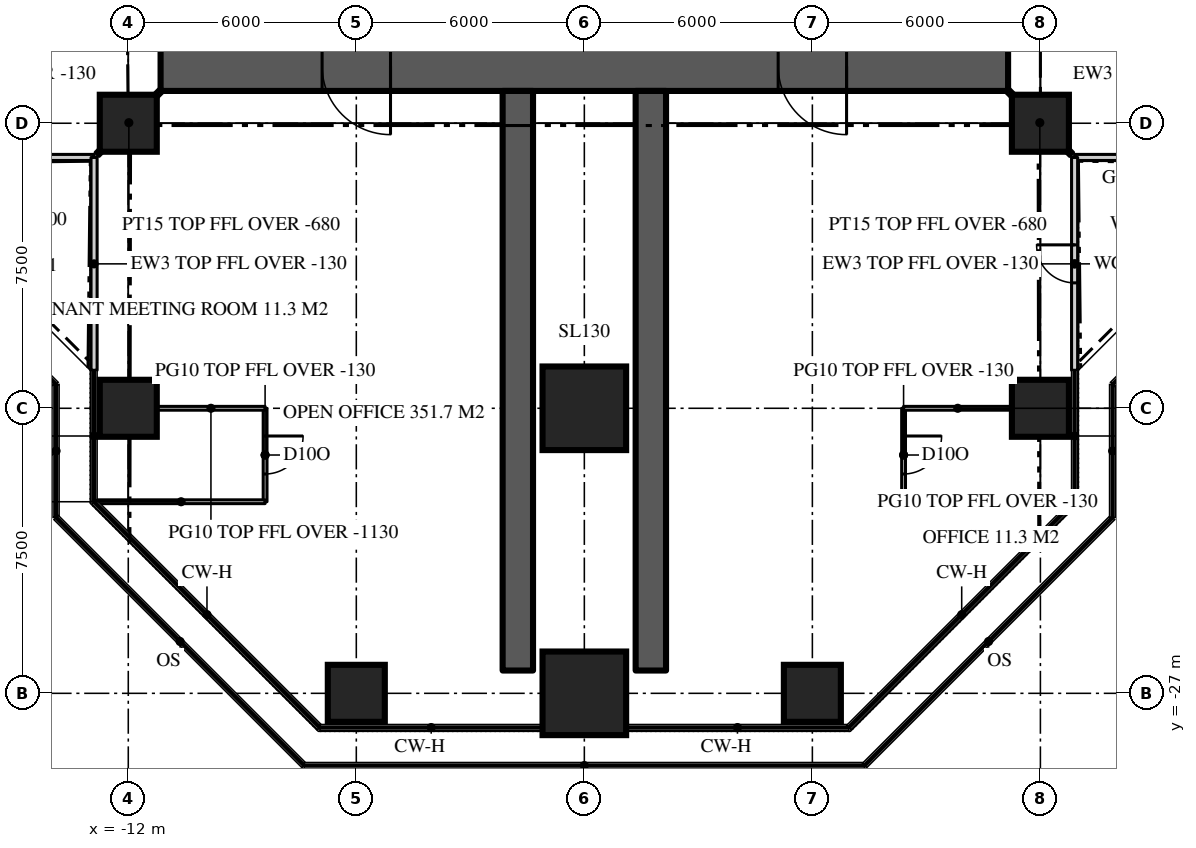
"""IFC4 building model, lengths in metres.
Left out: names, types, materials, properties, quantities, classifications, styles, units other than length and angle.
Written with IfcOpenShell. Run it as: python <this file> out.ifc"""

import sys

from ifc_helpers import new_model, si_unit, direction, frame, frame_2d, origin, origin_2d, place, context, subcontext, project, spatial, rectangle, extrude, element, fill, save


model = new_model("IFC4")
c1 = context("Model", 3, precision=1e-05, world=origin(), true_north=direction((0.0, 1.0)))
c2 = subcontext(c1, "Body", "Model", "MODEL_VIEW")
j1 = project(units=[si_unit("LENGTHUNIT", "METRE"), si_unit("PLANEANGLEUNIT", "RADIAN")], contexts=[c1])
p1 = place(None, origin())
s1 = spatial("IfcSite", under=j1, at=p1, CompositionType="ELEMENT")
p2 = place(p1, origin())
s2 = spatial("IfcBuilding", under=s1, at=p2, CompositionType="ELEMENT")
p3 = place(p2, frame((0.0, 0.0, 263.4)))
s3 = spatial("IfcBuildingStorey", under=s2, at=p3, CompositionType="ELEMENT", Elevation=263.4)
p4 = place(p3, frame((11.15, -10.5, 0.0), z_axis=(0.0, 0.0, 1.0), x_axis=(-1.0, 0.0, 0.0)))
e1 = element("IfcWall", 1, at=p4, inside=s3, PredefinedType="SHEAR", context=c2, shape_type="SweptSolid", body=[
    extrude(rectangle(XDim=22.3, YDim=1.3, at=frame_2d((11.15, 0.0))), origin(), (0.0, 0.0, 1.0), 3.9),
])
p5 = place(p4, frame((16.25, 0.0, 0.0)))
e2 = element("IfcOpeningElement", 2, at=p5, cuts=e1, PredefinedType="OPENING", context=c2, shape_type="SweptSolid", body=[
    extrude(rectangle(XDim=1.8, YDim=2.2, at=frame_2d((0.9, 1.1))), frame((0.0, 0.66, 0.0), z_axis=(0.0, -1.0, 0.0), x_axis=(1.0, 0.0, 0.0)), (0.0, 0.0, 1.0), 1.32),
])
p6 = place(p4, frame((4.25, 0.0, 0.0)))
e3 = element("IfcOpeningElement", 3, at=p6, cuts=e1, PredefinedType="OPENING", context=c2, shape_type="SweptSolid", body=[
    extrude(rectangle(XDim=1.8, YDim=2.2, at=frame_2d((0.9, 1.1))), frame((0.0, 0.66, 0.0), z_axis=(0.0, -1.0, 0.0), x_axis=(1.0, 0.0, 0.0)), (0.0, 0.0, 1.0), 1.32),
])
for number, where, z_axis, x_axis in (
    (4, (-1.75, -11.15, 0.0), (0.0, 0.0, 1.0), (0.0, -1.0, 0.0)),
    (5, (1.75, -11.15, 0.0), (0.0, 0.0, 1.0), (0.0, -1.0, 0.0)),
):
    element("IfcWall", number, at=place(p3, frame(where, z_axis=z_axis, x_axis=x_axis)), inside=s3, PredefinedType="SHEAR", context=c2, shape_type="SweptSolid", body=[
        extrude(rectangle(XDim=15.25, YDim=0.8, at=frame_2d((7.625, 0.0))), origin(), (0.0, 0.0, 1.0), 3.9),
    ])
p7 = place(p3, frame((-6.0, -27.0, 0.0), z_axis=(0.0, 0.0, 1.0), x_axis=(1.0, 0.0, 0.0)))
e6 = element("IfcColumn", 6, at=p7, inside=s3, PredefinedType="COLUMN", context=c2, shape_type="SweptSolid", body=[
    extrude(rectangle(XDim=1.5, YDim=1.5, at=origin_2d()), origin(), (0.0, 0.0, 1.0), 3.9),
])
p8 = place(p3, frame((0.0, -27.0, 0.0), z_axis=(0.0, 0.0, 1.0), x_axis=(1.0, 0.0, 0.0)))
e7 = element("IfcColumn", 7, at=p8, inside=s3, PredefinedType="COLUMN", context=c2, shape_type="SweptSolid", body=[
    extrude(rectangle(XDim=2.2, YDim=2.2, at=origin_2d()), origin(), (0.0, 0.0, 1.0), 3.9),
])
for number, where, z_axis, x_axis in (
    (8, (6.0, -27.0, 0.0), (0.0, 0.0, 1.0), (1.0, 0.0, 0.0)),
    (9, (-12.0, -19.5, 0.0), (0.0, 0.0, 1.0), (1.0, 0.0, 0.0)),
):
    element("IfcColumn", number, at=place(p3, frame(where, z_axis=z_axis, x_axis=x_axis)), inside=s3, PredefinedType="COLUMN", context=c2, shape_type="SweptSolid", body=[
        extrude(rectangle(XDim=1.5, YDim=1.5, at=origin_2d()), origin(), (0.0, 0.0, 1.0), 3.9),
    ])
p9 = place(p3, frame((0.0, -19.5, 0.0), z_axis=(0.0, 0.0, 1.0), x_axis=(1.0, 0.0, 0.0)))
e10 = element("IfcColumn", 10, at=p9, inside=s3, PredefinedType="COLUMN", context=c2, shape_type="SweptSolid", body=[
    extrude(rectangle(XDim=2.2, YDim=2.2, at=origin_2d()), origin(), (0.0, 0.0, 1.0), 3.9),
])
for number, where, z_axis, x_axis in (
    (11, (12.0, -19.5, 0.0), (0.0, 0.0, 1.0), (1.0, 0.0, 0.0)),
    (12, (-12.0, -12.0, 0.0), (0.0, 0.0, 1.0), (1.0, 0.0, 0.0)),
    (13, (12.0, -12.0, 0.0), (0.0, 0.0, 1.0), (1.0, 0.0, 0.0)),
):
    element("IfcColumn", number, at=place(p3, frame(where, z_axis=z_axis, x_axis=x_axis)), inside=s3, PredefinedType="COLUMN", context=c2, shape_type="SweptSolid", body=[
        extrude(rectangle(XDim=1.5, YDim=1.5, at=origin_2d()), origin(), (0.0, 0.0, 1.0), 3.9),
    ])
p10 = place(p3, frame((12.9, -12.9, 0.0), z_axis=(0.0, 0.0, 1.0), x_axis=(1.0, 0.0, 0.0)))
e14 = element("IfcWall", 14, at=p10, inside=s3, PredefinedType="SOLIDWALL", context=c2, shape_type="SweptSolid", body=[
    extrude(rectangle(XDim=5.6, YDim=0.16, at=frame_2d((2.8, 0.0))), origin(), (0.0, 0.0, 1.0), 3.77),
])
p11 = place(p3, frame((-18.5, -12.9, 0.0), z_axis=(0.0, 0.0, 1.0), x_axis=(1.0, 0.0, 0.0)))
e15 = element("IfcWall", 15, at=p11, inside=s3, PredefinedType="SOLIDWALL", context=c2, shape_type="SweptSolid", body=[
    extrude(rectangle(XDim=5.6, YDim=0.16, at=frame_2d((2.8, 0.0))), origin(), (0.0, 0.0, 1.0), 3.77),
])
p12 = place(p11, frame((2.3, 0.0, 0.0)))
e16 = element("IfcOpeningElement", 16, at=p12, cuts=e15, PredefinedType="OPENING", context=c2, shape_type="SweptSolid", body=[
    extrude(rectangle(XDim=1.0, YDim=2.2, at=frame_2d((0.5, 1.1))), frame((0.0, 0.09, 0.0), z_axis=(0.0, -1.0, 0.0), x_axis=(1.0, 0.0, 0.0)), (0.0, 0.0, 1.0), 0.18),
])
p13 = place(p3, frame((-12.9, -12.9, 0.0), z_axis=(0.0, 0.0, 1.0), x_axis=(0.0, -1.0, 0.0)))
e17 = element("IfcWall", 17, at=p13, inside=s3, PredefinedType="SOLIDWALL", context=c2, shape_type="SweptSolid", body=[
    extrude(rectangle(XDim=5.6, YDim=0.16, at=frame_2d((2.8, 0.0))), origin(), (0.0, 0.0, 1.0), 3.77),
])
p14 = place(p3, frame((12.9, -18.5, 0.0), z_axis=(0.0, 0.0, 1.0), x_axis=(0.0, 1.0, 0.0)))
e18 = element("IfcWall", 18, at=p14, inside=s3, PredefinedType="SOLIDWALL", context=c2, shape_type="SweptSolid", body=[
    extrude(rectangle(XDim=5.6, YDim=0.16, at=frame_2d((2.8, 0.0))), origin(), (0.0, 0.0, 1.0), 3.77),
])
p15 = place(p14, frame((2.3, 0.0, 0.0)))
e19 = element("IfcOpeningElement", 19, at=p15, cuts=e18, PredefinedType="OPENING", context=c2, shape_type="SweptSolid", body=[
    extrude(rectangle(XDim=1.0, YDim=2.2, at=frame_2d((0.5, 1.1))), frame((0.0, 0.09, 0.0), z_axis=(0.0, -1.0, 0.0), x_axis=(1.0, 0.0, 0.0)), (0.0, 0.0, 1.0), 0.18),
])
p16 = place(p3, frame((8.4, -19.5, 0.0), z_axis=(0.0, 0.0, 1.0), x_axis=(0.0, -1.0, 0.0)))
e20 = element("IfcWall", 20, at=p16, inside=s3, PredefinedType="PARTITIONING", context=c2, shape_type="SweptSolid", body=[
    extrude(rectangle(XDim=2.459, YDim=0.1, at=frame_2d((1.229, 0.0))), origin(), (0.0, 0.0, 1.0), 3.77),
])
p17 = place(p16, frame((0.729, 0.0, 0.0)))
e21 = element("IfcOpeningElement", 21, at=p17, cuts=e20, PredefinedType="OPENING", context=c2, shape_type="SweptSolid", body=[
    extrude(rectangle(XDim=1.0, YDim=2.2, at=frame_2d((0.5, 1.1))), frame((0.0, 0.06, 0.0), z_axis=(0.0, -1.0, 0.0), x_axis=(1.0, 0.0, 0.0)), (0.0, 0.0, 1.0), 0.12),
])
p18 = place(p3, frame((8.4, -19.5, 0.0), z_axis=(0.0, 0.0, 1.0), x_axis=(1.0, 0.0, 0.0)))
e22 = element("IfcWall", 22, at=p18, inside=s3, PredefinedType="PARTITIONING", context=c2, shape_type="SweptSolid", body=[
    extrude(rectangle(XDim=2.85, YDim=0.1, at=frame_2d((1.425, 0.0))), origin(), (0.0, 0.0, 1.0), 2.77),
])
p19 = place(p3, frame((8.4, -21.959, 0.0), z_axis=(0.0, 0.0, 1.0), x_axis=(1.0, 0.0, 0.0)))
e23 = element("IfcWall", 23, at=p19, inside=s3, PredefinedType="PARTITIONING", context=c2, shape_type="SweptSolid", body=[
    extrude(rectangle(XDim=4.42, YDim=0.1, at=frame_2d((2.21, 0.0))), origin(), (0.0, 0.0, 1.0), 3.77),
])
p20 = place(p3, frame((-8.4, -19.5, 0.0), z_axis=(0.0, 0.0, 1.0), x_axis=(0.0, -1.0, 0.0)))
e24 = element("IfcWall", 24, at=p20, inside=s3, PredefinedType="PARTITIONING", context=c2, shape_type="SweptSolid", body=[
    extrude(rectangle(XDim=2.459, YDim=0.1, at=frame_2d((1.229, 0.0))), origin(), (0.0, 0.0, 1.0), 3.77),
])
p21 = place(p20, frame((0.729, 0.0, 0.0)))
e25 = element("IfcOpeningElement", 25, at=p21, cuts=e24, PredefinedType="OPENING", context=c2, shape_type="SweptSolid", body=[
    extrude(rectangle(XDim=1.0, YDim=2.2, at=frame_2d((0.5, 1.1))), frame((0.0, 0.06, 0.0), z_axis=(0.0, -1.0, 0.0), x_axis=(1.0, 0.0, 0.0)), (0.0, 0.0, 1.0), 0.12),
])
p22 = place(p3, frame((-8.4, -19.5, 0.0), z_axis=(0.0, 0.0, 1.0), x_axis=(-1.0, 0.0, 0.0)))
e26 = element("IfcWall", 26, at=p22, inside=s3, PredefinedType="PARTITIONING", context=c2, shape_type="SweptSolid", body=[
    extrude(rectangle(XDim=2.85, YDim=0.1, at=frame_2d((1.425, 0.0))), origin(), (0.0, 0.0, 1.0), 2.77),
])
p23 = place(p3, frame((-8.4, -21.959, 0.0), z_axis=(0.0, 0.0, 1.0), x_axis=(-1.0, 0.0, 0.0)))
e27 = element("IfcWall", 27, at=p23, inside=s3, PredefinedType="PARTITIONING", context=c2, shape_type="SweptSolid", body=[
    extrude(rectangle(XDim=4.42, YDim=0.1, at=frame_2d((2.21, 0.0))), origin(), (0.0, 0.0, 1.0), 3.77),
])
for number, where, z_axis, x_axis in (
    (28, (-11.15, -11.15, 0.0), (0.0, 0.0, 1.0), (-0.707, -0.707, 0.0)),
    (29, (11.15, -11.15, 0.0), (0.0, 0.0, 1.0), (0.707, -0.707, 0.0)),
):
    element("IfcWall", number, at=place(p3, frame(where, z_axis=z_axis, x_axis=x_axis)), inside=s3, PredefinedType="PARTITIONING", context=c2, shape_type="SweptSolid", body=[
        extrude(rectangle(XDim=2.362, YDim=0.15, at=frame_2d((1.181, 0.0))), origin(), (0.0, 0.0, 1.0), 3.22),
    ])
p24 = place(p15, origin())
e30 = element("IfcDoor", 30, at=p24, inside=s3, OperationType="SINGLE_SWING_RIGHT", PredefinedType="DOOR", context=c2, shape_type="SweptSolid", body=[
    extrude(rectangle(XDim=1.0, YDim=2.2, at=frame_2d((0.5, 1.1))), frame((0.0, 0.025, 0.0), z_axis=(0.0, -1.0, 0.0), x_axis=(1.0, 0.0, 0.0)), (0.0, 0.0, 1.0), 0.05),
])
fill(e19, e30)
p25 = place(p5, origin())
e31 = element("IfcDoor", 31, at=p25, inside=s3, OperationType="DOUBLE_DOOR_DOUBLE_SWING", PredefinedType="DOOR", context=c2, shape_type="SweptSolid", body=[
    extrude(rectangle(XDim=1.8, YDim=2.2, at=frame_2d((0.9, 1.1))), frame((0.0, 0.025, 0.0), z_axis=(0.0, -1.0, 0.0), x_axis=(1.0, 0.0, 0.0)), (0.0, 0.0, 1.0), 0.05),
])
fill(e2, e31)
p26 = place(p6, origin())
e32 = element("IfcDoor", 32, at=p26, inside=s3, OperationType="DOUBLE_DOOR_DOUBLE_SWING", PredefinedType="DOOR", context=c2, shape_type="SweptSolid", body=[
    extrude(rectangle(XDim=1.8, YDim=2.2, at=frame_2d((0.9, 1.1))), frame((0.0, 0.025, 0.0), z_axis=(0.0, -1.0, 0.0), x_axis=(1.0, 0.0, 0.0)), (0.0, 0.0, 1.0), 0.05),
])
fill(e3, e32)
p27 = place(p17, origin())
e33 = element("IfcDoor", 33, at=p27, inside=s3, OperationType="SINGLE_SWING_LEFT", PredefinedType="DOOR", context=c2, shape_type="SweptSolid", body=[
    extrude(rectangle(XDim=1.0, YDim=2.2, at=frame_2d((0.5, 1.1))), frame((0.0, 0.025, 0.0), z_axis=(0.0, -1.0, 0.0), x_axis=(1.0, 0.0, 0.0)), (0.0, 0.0, 1.0), 0.05),
])
fill(e21, e33)
p28 = place(p21, origin())
e34 = element("IfcDoor", 34, at=p28, inside=s3, OperationType="SINGLE_SWING_LEFT", PredefinedType="DOOR", context=c2, shape_type="SweptSolid", body=[
    extrude(rectangle(XDim=1.0, YDim=2.2, at=frame_2d((0.5, 1.1))), frame((0.0, 0.025, 0.0), z_axis=(0.0, -1.0, 0.0), x_axis=(1.0, 0.0, 0.0)), (0.0, 0.0, 1.0), 0.05),
])
fill(e25, e34)
save(model, sys.argv[1])
